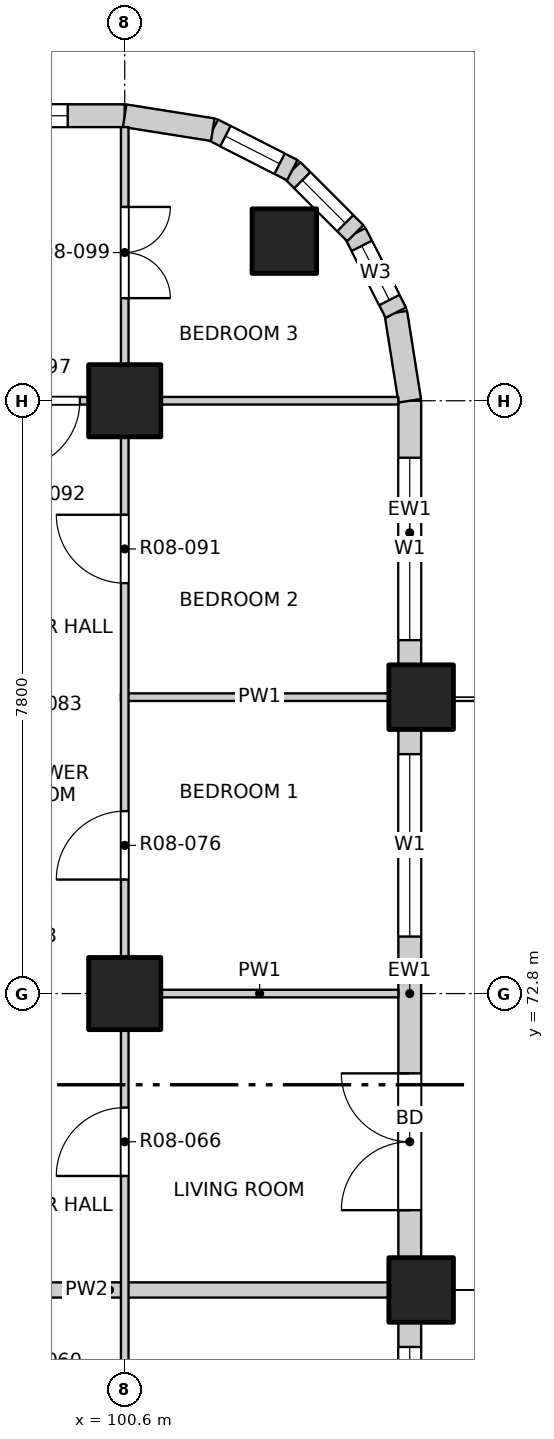
"""IFC4 building model, lengths in metres.
Left out: names, types, materials, properties, quantities, classifications, styles, units other than length and angle.
Written with IfcOpenShell. Run it as: python <this file> out.ifc"""

import sys

from ifc_helpers import new_model, si_unit, direction, frame, frame_2d, origin, origin_2d, place, context, subcontext, project, spatial, rectangle, extrude, element, fill, save


model = new_model("IFC4")
c1 = context("Model", 3, precision=1e-05, world=origin(), true_north=direction((0.0, 1.0)))
c2 = subcontext(c1, "Body", "Model", "MODEL_VIEW")
j1 = project(units=[si_unit("LENGTHUNIT", "METRE"), si_unit("PLANEANGLEUNIT", "RADIAN")], contexts=[c1])
p1 = place(None, origin())
s1 = spatial("IfcSite", under=j1, at=p1, CompositionType="ELEMENT")
p2 = place(p1, origin())
s2 = spatial("IfcBuilding", under=s1, at=p2, CompositionType="ELEMENT")
p3 = place(p2, frame((0.0, 0.0, 103.3)))
s3 = spatial("IfcBuildingStorey", under=s2, at=p3, CompositionType="ELEMENT", Elevation=103.3)
for number, where, z_axis, x_axis in (
    (1, (102.7, 82.7, -0.25), (0.0, 0.0, 1.0), (1.0, 0.0, 0.0)),
    (2, (104.5, 68.9, -0.25), (0.0, 0.0, 1.0), (1.0, 0.0, 0.0)),
    (3, (104.5, 76.7, -0.25), (0.0, 0.0, 1.0), (1.0, 0.0, 0.0)),
):
    element("IfcColumn", number, at=place(p3, frame(where, z_axis=z_axis, x_axis=x_axis)), inside=s3, PredefinedType="COLUMN", context=c2, shape_type="SweptSolid", body=[
        extrude(rectangle(XDim=0.85, YDim=0.85, at=origin_2d()), origin(), (0.0, 0.0, 1.0), 3.4),
    ])
for number, where, z_axis, x_axis in (
    (4, (100.6, 72.8, -0.25), (0.0, 0.0, 1.0), (1.0, 0.0, 0.0)),
    (5, (100.6, 80.6, -0.25), (0.0, 0.0, 1.0), (1.0, 0.0, 0.0)),
):
    element("IfcColumn", number, at=place(p3, frame(where, z_axis=z_axis, x_axis=x_axis)), inside=s3, PredefinedType="COLUMN", context=c2, shape_type="SweptSolid", body=[
        extrude(rectangle(XDim=0.95, YDim=0.95, at=origin_2d()), origin(), (0.0, 0.0, 1.0), 3.4),
    ])
p4 = place(p3, frame((104.35, 61.525, 0.0), z_axis=(0.0, 0.0, 1.0), x_axis=(0.0, 1.0, 0.0)))
e6 = element("IfcWall", 6, at=p4, inside=s3, PredefinedType="SOLIDWALL", context=c2, shape_type="SweptSolid", body=[
    extrude(rectangle(XDim=6.95, YDim=0.3, at=frame_2d((3.475, 0.0))), origin(), (0.0, 0.0, 1.0), 2.7),
])
p5 = place(p4, frame((0.625, 0.0, 0.0)))
e7 = element("IfcOpeningElement", 7, at=p5, cuts=e6, PredefinedType="OPENING", context=c2, shape_type="SweptSolid", body=[
    extrude(rectangle(XDim=1.8, YDim=2.4, at=frame_2d((0.9, 1.2))), frame((0.0, 0.16, 0.0), z_axis=(0.0, -1.0, 0.0), x_axis=(1.0, 0.0, 0.0)), (0.0, 0.0, 1.0), 0.32),
])
p6 = place(p4, frame((4.225, 0.0, 0.9)))
e8 = element("IfcOpeningElement", 8, at=p6, cuts=e6, PredefinedType="OPENING", context=c2, shape_type="SweptSolid", body=[
    extrude(rectangle(XDim=2.4, YDim=1.8, at=frame_2d((1.2, 0.9))), frame((0.0, 0.16, 0.0), z_axis=(0.0, -1.0, 0.0), x_axis=(1.0, 0.0, 0.0)), (0.0, 0.0, 1.0), 0.32),
])
p7 = place(p3, frame((104.35, 69.325, 0.0), z_axis=(0.0, 0.0, 1.0), x_axis=(0.0, 1.0, 0.0)))
e9 = element("IfcWall", 9, at=p7, inside=s3, PredefinedType="SOLIDWALL", context=c2, shape_type="SweptSolid", body=[
    extrude(rectangle(XDim=6.95, YDim=0.3, at=frame_2d((3.475, 0.0))), origin(), (0.0, 0.0, 1.0), 2.7),
])
p8 = place(p7, frame((0.625, 0.0, 0.0)))
e10 = element("IfcOpeningElement", 10, at=p8, cuts=e9, PredefinedType="OPENING", context=c2, shape_type="SweptSolid", body=[
    extrude(rectangle(XDim=1.8, YDim=2.4, at=frame_2d((0.9, 1.2))), frame((0.0, 0.16, 0.0), z_axis=(0.0, -1.0, 0.0), x_axis=(1.0, 0.0, 0.0)), (0.0, 0.0, 1.0), 0.32),
])
p9 = place(p7, frame((4.225, 0.0, 0.9)))
e11 = element("IfcOpeningElement", 11, at=p9, cuts=e9, PredefinedType="OPENING", context=c2, shape_type="SweptSolid", body=[
    extrude(rectangle(XDim=2.4, YDim=1.8, at=frame_2d((1.2, 0.9))), frame((0.0, 0.16, 0.0), z_axis=(0.0, -1.0, 0.0), x_axis=(1.0, 0.0, 0.0)), (0.0, 0.0, 1.0), 0.32),
])
p10 = place(p3, frame((104.35, 77.125, 0.0), z_axis=(0.0, 0.0, 1.0), x_axis=(0.0, 1.0, 0.0)))
e12 = element("IfcWall", 12, at=p10, inside=s3, PredefinedType="SOLIDWALL", context=c2, shape_type="SweptSolid", body=[
    extrude(rectangle(XDim=3.475, YDim=0.3, at=frame_2d((1.738, 0.0))), origin(), (0.0, 0.0, 1.0), 2.7),
])
p11 = place(p10, frame((0.325, 0.0, 0.9)))
e13 = element("IfcOpeningElement", 13, at=p11, cuts=e12, PredefinedType="OPENING", context=c2, shape_type="SweptSolid", body=[
    extrude(rectangle(XDim=2.4, YDim=1.8, at=frame_2d((1.2, 0.9))), frame((0.0, 0.16, 0.0), z_axis=(0.0, -1.0, 0.0), x_axis=(1.0, 0.0, 0.0)), (0.0, 0.0, 1.0), 0.32),
])
p12 = place(p3, frame((97.125, 84.35, 0.0), z_axis=(0.0, 0.0, 1.0), x_axis=(1.0, 0.0, 0.0)))
e14 = element("IfcWall", 14, at=p12, inside=s3, PredefinedType="SOLIDWALL", context=c2, shape_type="SweptSolid", body=[
    extrude(rectangle(XDim=3.475, YDim=0.3, at=frame_2d((1.738, 0.0))), origin(), (0.0, 0.0, 1.0), 2.7),
])
p13 = place(p12, frame((0.325, 0.0, 0.9)))
e15 = element("IfcOpeningElement", 15, at=p13, cuts=e14, PredefinedType="OPENING", context=c2, shape_type="SweptSolid", body=[
    extrude(rectangle(XDim=2.4, YDim=1.8, at=frame_2d((1.2, 0.9))), frame((0.0, 0.16, 0.0), z_axis=(0.0, -1.0, 0.0), x_axis=(1.0, 0.0, 0.0)), (0.0, 0.0, 1.0), 0.32),
])
p14 = place(p3, frame((104.35, 80.6, 0.0), z_axis=(0.0, 0.0, 1.0), x_axis=(-0.156496880861, 0.987678452879, 0.0)))
e16 = element("IfcWall", 16, at=p14, inside=s3, PredefinedType="SOLIDWALL", context=c2, shape_type="SweptSolid", body=[
    extrude(rectangle(XDim=1.173, YDim=0.3, at=frame_2d((0.586, 0.0))), origin(), (0.0, 0.0, 1.0), 2.7),
])
p15 = place(p3, frame((104.167, 81.759, 0.0), z_axis=(0.0, 0.0, 1.0), x_axis=(-0.454025524128, 0.890988677504, 0.0)))
e17 = element("IfcWall", 17, at=p15, inside=s3, PredefinedType="SOLIDWALL", context=c2, shape_type="SweptSolid", body=[
    extrude(rectangle(XDim=1.173, YDim=0.3, at=frame_2d((0.587, 0.0))), origin(), (0.0, 0.0, 1.0), 2.7),
])
p16 = place(p15, frame((0.187, 0.0, 0.9)))
e18 = element("IfcOpeningElement", 18, at=p16, cuts=e17, PredefinedType="OPENING", context=c2, shape_type="SweptSolid", body=[
    extrude(rectangle(XDim=0.8, YDim=1.2, at=frame_2d((0.4, 0.6))), frame((0.0, 0.16, 0.0), z_axis=(0.0, -1.0, 0.0), x_axis=(1.0, 0.0, 0.0)), (0.0, 0.0, 1.0), 0.32),
])
p17 = place(p3, frame((103.634, 82.804, 0.0), z_axis=(0.0, 0.0, 1.0), x_axis=(-0.707106781187, 0.707106781187, 0.0)))
e19 = element("IfcWall", 19, at=p17, inside=s3, PredefinedType="SOLIDWALL", context=c2, shape_type="SweptSolid", body=[
    extrude(rectangle(XDim=1.173, YDim=0.3, at=frame_2d((0.586, 0.0))), origin(), (0.0, 0.0, 1.0), 2.7),
])
p18 = place(p17, frame((0.187, 0.0, 0.9)))
e20 = element("IfcOpeningElement", 20, at=p18, cuts=e19, PredefinedType="OPENING", context=c2, shape_type="SweptSolid", body=[
    extrude(rectangle(XDim=0.8, YDim=1.2, at=frame_2d((0.4, 0.6))), frame((0.0, 0.16, 0.0), z_axis=(0.0, -1.0, 0.0), x_axis=(1.0, 0.0, 0.0)), (0.0, 0.0, 1.0), 0.32),
])
p19 = place(p3, frame((102.804, 83.634, 0.0), z_axis=(0.0, 0.0, 1.0), x_axis=(-0.890988677504, 0.454025524128, 0.0)))
e21 = element("IfcWall", 21, at=p19, inside=s3, PredefinedType="SOLIDWALL", context=c2, shape_type="SweptSolid", body=[
    extrude(rectangle(XDim=1.173, YDim=0.3, at=frame_2d((0.587, 0.0))), origin(), (0.0, 0.0, 1.0), 2.7),
])
p20 = place(p19, frame((0.187, 0.0, 0.9)))
e22 = element("IfcOpeningElement", 22, at=p20, cuts=e21, PredefinedType="OPENING", context=c2, shape_type="SweptSolid", body=[
    extrude(rectangle(XDim=0.8, YDim=1.2, at=frame_2d((0.4, 0.6))), frame((0.0, 0.16, 0.0), z_axis=(0.0, -1.0, 0.0), x_axis=(1.0, 0.0, 0.0)), (0.0, 0.0, 1.0), 0.32),
])
p21 = place(p3, frame((101.759, 84.167, 0.0), z_axis=(0.0, 0.0, 1.0), x_axis=(-0.987678452879, 0.156496880861, 0.0)))
e23 = element("IfcWall", 23, at=p21, inside=s3, PredefinedType="SOLIDWALL", context=c2, shape_type="SweptSolid", body=[
    extrude(rectangle(XDim=1.173, YDim=0.3, at=frame_2d((0.586, 0.0))), origin(), (0.0, 0.0, 1.0), 2.7),
])
p22 = place(p3, frame((96.6, 68.9, 0.0), z_axis=(0.0, 0.0, 1.0), x_axis=(1.0, 0.0, 0.0)))
e24 = element("IfcWall", 24, at=p22, inside=s3, PredefinedType="PARTITIONING", context=c2, shape_type="SweptSolid", body=[
    extrude(rectangle(XDim=7.6, YDim=0.2, at=frame_2d((3.8, 0.0))), origin(), (0.0, 0.0, 1.0), 2.55),
])
p23 = place(p3, frame((100.55, 72.8, 0.0), z_axis=(0.0, 0.0, 1.0), x_axis=(1.0, 0.0, 0.0)))
e25 = element("IfcWall", 25, at=p23, inside=s3, PredefinedType="PARTITIONING", context=c2, shape_type="SweptSolid", body=[
    extrude(rectangle(XDim=3.65, YDim=0.1, at=frame_2d((1.825, 0.0))), origin(), (0.0, 0.0, 1.0), 3.15),
])
p24 = place(p3, frame((100.55, 76.7, 0.0), z_axis=(0.0, 0.0, 1.0), x_axis=(1.0, 0.0, 0.0)))
e26 = element("IfcWall", 26, at=p24, inside=s3, PredefinedType="PARTITIONING", context=c2, shape_type="SweptSolid", body=[
    extrude(rectangle(XDim=3.65, YDim=0.1, at=frame_2d((1.825, 0.0))), origin(), (0.0, 0.0, 1.0), 2.55),
])
p25 = place(p3, frame((96.6, 80.6, 0.0), z_axis=(0.0, 0.0, 1.0), x_axis=(1.0, 0.0, 0.0)))
e27 = element("IfcWall", 27, at=p25, inside=s3, PredefinedType="PARTITIONING", context=c2, shape_type="SweptSolid", body=[
    extrude(rectangle(XDim=7.6, YDim=0.1, at=frame_2d((3.8, 0.0))), origin(), (0.0, 0.0, 1.0), 3.15),
])
p26 = place(p25, frame((2.51, 0.0, 0.0)))
e28 = element("IfcOpeningElement", 28, at=p26, cuts=e27, PredefinedType="OPENING", context=c2, shape_type="SweptSolid", body=[
    extrude(rectangle(XDim=0.9, YDim=2.1, at=frame_2d((0.45, 1.05))), frame((0.0, 0.06, 0.0), z_axis=(0.0, -1.0, 0.0), x_axis=(1.0, 0.0, 0.0)), (0.0, 0.0, 1.0), 0.12),
])
p27 = place(p3, frame((100.6, 45.8, 0.0), z_axis=(0.0, 0.0, 1.0), x_axis=(0.0, 1.0, 0.0)))
e29 = element("IfcWall", 29, at=p27, inside=s3, PredefinedType="PARTITIONING", context=c2, shape_type="SweptSolid", body=[
    extrude(rectangle(XDim=38.4, YDim=0.1, at=frame_2d((19.2, 0.0))), origin(), (0.0, 0.0, 1.0), 3.15),
])
p28 = place(p27, frame((1.05, 0.0, 0.0)))
e30 = element("IfcOpeningElement", 30, at=p28, cuts=e29, PredefinedType="OPENING", context=c2, shape_type="SweptSolid", body=[
    extrude(rectangle(XDim=1.2, YDim=2.1, at=frame_2d((0.6, 1.05))), frame((0.0, 0.06, 0.0), z_axis=(0.0, -1.0, 0.0), x_axis=(1.0, 0.0, 0.0)), (0.0, 0.0, 1.0), 0.12),
])
p29 = place(p27, frame((5.1, 0.0, 0.0)))
e31 = element("IfcOpeningElement", 31, at=p29, cuts=e29, PredefinedType="OPENING", context=c2, shape_type="SweptSolid", body=[
    extrude(rectangle(XDim=0.9, YDim=2.1, at=frame_2d((0.45, 1.05))), frame((0.0, 0.06, 0.0), z_axis=(0.0, -1.0, 0.0), x_axis=(1.0, 0.0, 0.0)), (0.0, 0.0, 1.0), 0.12),
])
p30 = place(p27, frame((9.0, 0.0, 0.0)))
e32 = element("IfcOpeningElement", 32, at=p30, cuts=e29, PredefinedType="OPENING", context=c2, shape_type="SweptSolid", body=[
    extrude(rectangle(XDim=0.9, YDim=2.1, at=frame_2d((0.45, 1.05))), frame((0.0, 0.06, 0.0), z_axis=(0.0, -1.0, 0.0), x_axis=(1.0, 0.0, 0.0)), (0.0, 0.0, 1.0), 0.12),
])
p31 = place(p27, frame((12.9, 0.0, 0.0)))
e33 = element("IfcOpeningElement", 33, at=p31, cuts=e29, PredefinedType="OPENING", context=c2, shape_type="SweptSolid", body=[
    extrude(rectangle(XDim=0.9, YDim=2.1, at=frame_2d((0.45, 1.05))), frame((0.0, 0.06, 0.0), z_axis=(0.0, -1.0, 0.0), x_axis=(1.0, 0.0, 0.0)), (0.0, 0.0, 1.0), 0.12),
])
p32 = place(p27, frame((16.8, 0.0, 0.0)))
e34 = element("IfcOpeningElement", 34, at=p32, cuts=e29, PredefinedType="OPENING", context=c2, shape_type="SweptSolid", body=[
    extrude(rectangle(XDim=0.9, YDim=2.1, at=frame_2d((0.45, 1.05))), frame((0.0, 0.06, 0.0), z_axis=(0.0, -1.0, 0.0), x_axis=(1.0, 0.0, 0.0)), (0.0, 0.0, 1.0), 0.12),
])
p33 = place(p27, frame((20.7, 0.0, 0.0)))
e35 = element("IfcOpeningElement", 35, at=p33, cuts=e29, PredefinedType="OPENING", context=c2, shape_type="SweptSolid", body=[
    extrude(rectangle(XDim=0.9, YDim=2.1, at=frame_2d((0.45, 1.05))), frame((0.0, 0.06, 0.0), z_axis=(0.0, -1.0, 0.0), x_axis=(1.0, 0.0, 0.0)), (0.0, 0.0, 1.0), 0.12),
])
p34 = place(p27, frame((24.6, 0.0, 0.0)))
e36 = element("IfcOpeningElement", 36, at=p34, cuts=e29, PredefinedType="OPENING", context=c2, shape_type="SweptSolid", body=[
    extrude(rectangle(XDim=0.9, YDim=2.1, at=frame_2d((0.45, 1.05))), frame((0.0, 0.06, 0.0), z_axis=(0.0, -1.0, 0.0), x_axis=(1.0, 0.0, 0.0)), (0.0, 0.0, 1.0), 0.12),
])
p35 = place(p27, frame((28.5, 0.0, 0.0)))
e37 = element("IfcOpeningElement", 37, at=p35, cuts=e29, PredefinedType="OPENING", context=c2, shape_type="SweptSolid", body=[
    extrude(rectangle(XDim=0.9, YDim=2.1, at=frame_2d((0.45, 1.05))), frame((0.0, 0.06, 0.0), z_axis=(0.0, -1.0, 0.0), x_axis=(1.0, 0.0, 0.0)), (0.0, 0.0, 1.0), 0.12),
])
p36 = place(p27, frame((32.4, 0.0, 0.0)))
e38 = element("IfcOpeningElement", 38, at=p36, cuts=e29, PredefinedType="OPENING", context=c2, shape_type="SweptSolid", body=[
    extrude(rectangle(XDim=0.9, YDim=2.1, at=frame_2d((0.45, 1.05))), frame((0.0, 0.06, 0.0), z_axis=(0.0, -1.0, 0.0), x_axis=(1.0, 0.0, 0.0)), (0.0, 0.0, 1.0), 0.12),
])
p37 = place(p27, frame((36.15, 0.0, 0.0)))
e39 = element("IfcOpeningElement", 39, at=p37, cuts=e29, PredefinedType="OPENING", context=c2, shape_type="SweptSolid", body=[
    extrude(rectangle(XDim=1.2, YDim=2.1, at=frame_2d((0.6, 1.05))), frame((0.0, 0.06, 0.0), z_axis=(0.0, -1.0, 0.0), x_axis=(1.0, 0.0, 0.0)), (0.0, 0.0, 1.0), 0.12),
])
p38 = place(p6, origin())
e40 = element("IfcWindow", 40, at=p38, inside=s3, PartitioningType="DOUBLE_PANEL_VERTICAL", PredefinedType="WINDOW", context=c2, shape_type="SweptSolid", body=[
    extrude(rectangle(XDim=2.4, YDim=1.8, at=frame_2d((1.2, 0.9))), frame((0.0, 0.03, 0.0), z_axis=(0.0, -1.0, 0.0), x_axis=(1.0, 0.0, 0.0)), (0.0, 0.0, 1.0), 0.06),
])
fill(e8, e40)
p39 = place(p8, origin())
e41 = element("IfcDoor", 41, at=p39, inside=s3, OperationType="DOUBLE_DOOR_SINGLE_SWING", PredefinedType="DOOR", context=c2, shape_type="SweptSolid", body=[
    extrude(rectangle(XDim=1.8, YDim=2.4, at=frame_2d((0.9, 1.2))), frame((0.0, 0.025, 0.0), z_axis=(0.0, -1.0, 0.0), x_axis=(1.0, 0.0, 0.0)), (0.0, 0.0, 1.0), 0.05),
])
fill(e10, e41)
p40 = place(p9, origin())
e42 = element("IfcWindow", 42, at=p40, inside=s3, PartitioningType="DOUBLE_PANEL_VERTICAL", PredefinedType="WINDOW", context=c2, shape_type="SweptSolid", body=[
    extrude(rectangle(XDim=2.4, YDim=1.8, at=frame_2d((1.2, 0.9))), frame((0.0, 0.03, 0.0), z_axis=(0.0, -1.0, 0.0), x_axis=(1.0, 0.0, 0.0)), (0.0, 0.0, 1.0), 0.06),
])
fill(e11, e42)
p41 = place(p11, origin())
e43 = element("IfcWindow", 43, at=p41, inside=s3, PartitioningType="DOUBLE_PANEL_VERTICAL", PredefinedType="WINDOW", context=c2, shape_type="SweptSolid", body=[
    extrude(rectangle(XDim=2.4, YDim=1.8, at=frame_2d((1.2, 0.9))), frame((0.0, 0.03, 0.0), z_axis=(0.0, -1.0, 0.0), x_axis=(1.0, 0.0, 0.0)), (0.0, 0.0, 1.0), 0.06),
])
fill(e13, e43)
p42 = place(p13, origin())
e44 = element("IfcWindow", 44, at=p42, inside=s3, PartitioningType="DOUBLE_PANEL_VERTICAL", PredefinedType="WINDOW", context=c2, shape_type="SweptSolid", body=[
    extrude(rectangle(XDim=2.4, YDim=1.8, at=frame_2d((1.2, 0.9))), frame((0.0, 0.03, 0.0), z_axis=(0.0, -1.0, 0.0), x_axis=(1.0, 0.0, 0.0)), (0.0, 0.0, 1.0), 0.06),
])
fill(e15, e44)
p43 = place(p16, origin())
e45 = element("IfcWindow", 45, at=p43, inside=s3, PartitioningType="SINGLE_PANEL", PredefinedType="WINDOW", context=c2, shape_type="SweptSolid", body=[
    extrude(rectangle(XDim=0.8, YDim=1.2, at=frame_2d((0.4, 0.6))), frame((0.0, 0.03, 0.0), z_axis=(0.0, -1.0, 0.0), x_axis=(1.0, 0.0, 0.0)), (0.0, 0.0, 1.0), 0.06),
])
fill(e18, e45)
p44 = place(p18, origin())
e46 = element("IfcWindow", 46, at=p44, inside=s3, PartitioningType="SINGLE_PANEL", PredefinedType="WINDOW", context=c2, shape_type="SweptSolid", body=[
    extrude(rectangle(XDim=0.8, YDim=1.2, at=frame_2d((0.4, 0.6))), frame((0.0, 0.03, 0.0), z_axis=(0.0, -1.0, 0.0), x_axis=(1.0, 0.0, 0.0)), (0.0, 0.0, 1.0), 0.06),
])
fill(e20, e46)
p45 = place(p20, origin())
e47 = element("IfcWindow", 47, at=p45, inside=s3, PartitioningType="SINGLE_PANEL", PredefinedType="WINDOW", context=c2, shape_type="SweptSolid", body=[
    extrude(rectangle(XDim=0.8, YDim=1.2, at=frame_2d((0.4, 0.6))), frame((0.0, 0.03, 0.0), z_axis=(0.0, -1.0, 0.0), x_axis=(1.0, 0.0, 0.0)), (0.0, 0.0, 1.0), 0.06),
])
fill(e22, e47)
p46 = place(p34, origin())
e48 = element("IfcDoor", 48, at=p46, inside=s3, OperationType="SINGLE_SWING_LEFT", PredefinedType="DOOR", context=c2, shape_type="SweptSolid", body=[
    extrude(rectangle(XDim=0.9, YDim=2.1, at=frame_2d((0.45, 1.05))), frame((0.0, 0.025, 0.0), z_axis=(0.0, -1.0, 0.0), x_axis=(1.0, 0.0, 0.0)), (0.0, 0.0, 1.0), 0.05),
])
fill(e36, e48)
p47 = place(p35, origin())
e49 = element("IfcDoor", 49, at=p47, inside=s3, OperationType="SINGLE_SWING_LEFT", PredefinedType="DOOR", context=c2, shape_type="SweptSolid", body=[
    extrude(rectangle(XDim=0.9, YDim=2.1, at=frame_2d((0.45, 1.05))), frame((0.0, 0.025, 0.0), z_axis=(0.0, -1.0, 0.0), x_axis=(1.0, 0.0, 0.0)), (0.0, 0.0, 1.0), 0.05),
])
fill(e37, e49)
p48 = place(p36, origin())
e50 = element("IfcDoor", 50, at=p48, inside=s3, OperationType="SINGLE_SWING_RIGHT", PredefinedType="DOOR", context=c2, shape_type="SweptSolid", body=[
    extrude(rectangle(XDim=0.9, YDim=2.1, at=frame_2d((0.45, 1.05))), frame((0.0, 0.025, 0.0), z_axis=(0.0, -1.0, 0.0), x_axis=(1.0, 0.0, 0.0)), (0.0, 0.0, 1.0), 0.05),
])
fill(e38, e50)
p49 = place(p26, origin())
e51 = element("IfcDoor", 51, at=p49, inside=s3, OperationType="SINGLE_SWING_RIGHT", PredefinedType="DOOR", context=c2, shape_type="SweptSolid", body=[
    extrude(rectangle(XDim=0.9, YDim=2.1, at=frame_2d((0.45, 1.05))), frame((0.0, 0.025, 0.0), z_axis=(0.0, -1.0, 0.0), x_axis=(1.0, 0.0, 0.0)), (0.0, 0.0, 1.0), 0.05),
])
fill(e28, e51)
p50 = place(p37, origin())
e52 = element("IfcDoor", 52, at=p50, inside=s3, OperationType="DOUBLE_DOOR_SINGLE_SWING", PredefinedType="DOOR", context=c2, shape_type="SweptSolid", body=[
    extrude(rectangle(XDim=1.2, YDim=2.1, at=frame_2d((0.6, 1.05))), frame((0.0, 0.025, 0.0), z_axis=(0.0, -1.0, 0.0), x_axis=(1.0, 0.0, 0.0)), (0.0, 0.0, 1.0), 0.05),
])
fill(e39, e52)
save(model, sys.argv[1])
